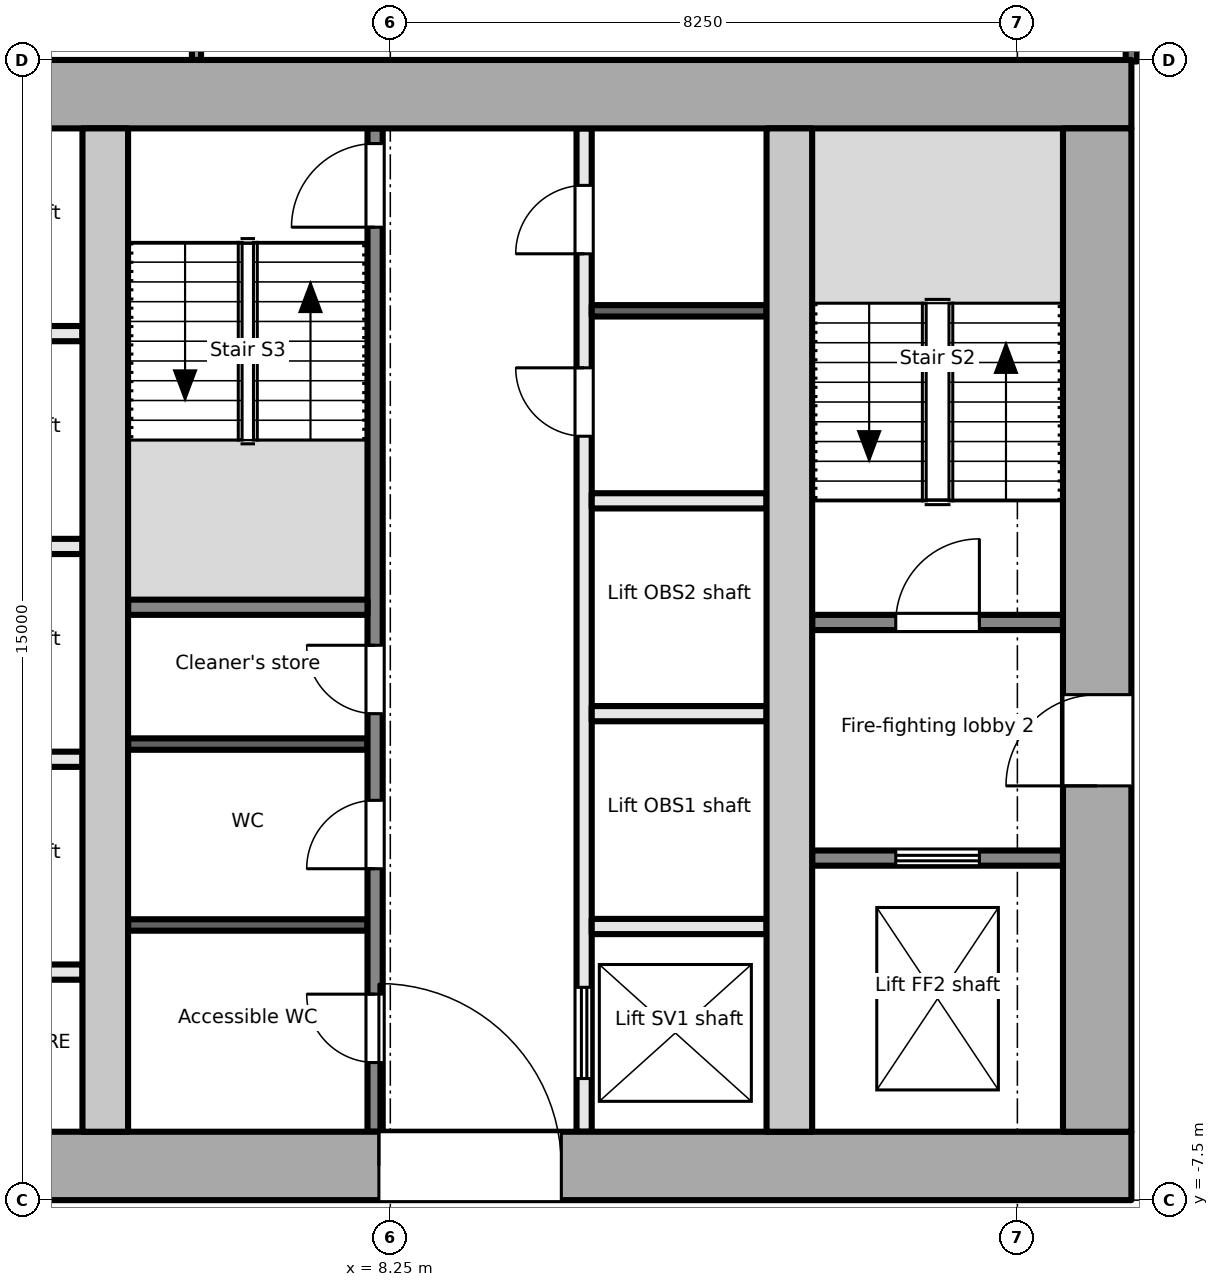
"""IFC4 building model, lengths in metres.
Left out: names, types, materials, properties, quantities, classifications, styles, units other than length and angle.
Written with IfcOpenShell. Run it as: python <this file> out.ifc"""

import sys

from ifc_helpers import new_model, si_unit, direction, frame, frame_2d, origin, place, context, subcontext, project, spatial, rectangle, extrude, element, fill, save


model = new_model("IFC4")
c1 = context("Model", 3, precision=1e-05, world=origin(), true_north=direction((0.0, 1.0)))
c2 = subcontext(c1, "Body", "Model", "MODEL_VIEW")
j1 = project(units=[si_unit("LENGTHUNIT", "METRE"), si_unit("PLANEANGLEUNIT", "RADIAN")], contexts=[c1])
p1 = place(None, origin())
s1 = spatial("IfcSite", under=j1, at=p1, CompositionType="ELEMENT")
p2 = place(p1, origin())
s2 = spatial("IfcBuilding", under=s1, at=p2, CompositionType="ELEMENT")
p3 = place(p2, frame((0.0, 0.0, 103.7)))
s3 = spatial("IfcBuildingStorey", under=s2, at=p3, CompositionType="ELEMENT", Elevation=103.7)
p4 = place(p3, frame((-18.0, -7.05, -0.2), z_axis=(0.0, 0.0, 1.0), x_axis=(1.0, 0.0, 0.0)))
e1 = element("IfcWall", 1, at=p4, inside=s3, PredefinedType="SHEAR", context=c2, shape_type="SweptSolid", body=[
    extrude(rectangle(XDim=36.0, YDim=0.9, at=frame_2d((18.0, 0.0))), origin(), (0.0, 0.0, 1.0), 4.0),
])
p5 = place(p4, frame((7.8, 0.0, 0.2)))
e2 = element("IfcOpeningElement", 2, at=p5, cuts=e1, PredefinedType="OPENING", context=c2, shape_type="SweptSolid", body=[
    extrude(rectangle(XDim=2.4, YDim=2.1, at=frame_2d((1.2, 1.05))), frame((0.0, 0.46, 0.0), z_axis=(0.0, -1.0, 0.0), x_axis=(1.0, 0.0, 0.0)), (0.0, 0.0, 1.0), 0.921),
])
p6 = place(p4, frame((17.4, 0.0, 0.2)))
e3 = element("IfcOpeningElement", 3, at=p6, cuts=e1, PredefinedType="OPENING", context=c2, shape_type="SweptSolid", body=[
    extrude(rectangle(XDim=1.2, YDim=2.1, at=frame_2d((0.6, 1.05))), frame((0.0, 0.46, 0.0), z_axis=(0.0, -1.0, 0.0), x_axis=(1.0, 0.0, 0.0)), (0.0, 0.0, 1.0), 0.921),
])
p7 = place(p4, frame((26.1, 0.0, 0.2)))
e4 = element("IfcOpeningElement", 4, at=p7, cuts=e1, PredefinedType="OPENING", context=c2, shape_type="SweptSolid", body=[
    extrude(rectangle(XDim=2.4, YDim=2.1, at=frame_2d((1.2, 1.05))), frame((0.0, 0.46, 0.0), z_axis=(0.0, -1.0, 0.0), x_axis=(1.0, 0.0, 0.0)), (0.0, 0.0, 1.0), 0.921),
])
p8 = place(p3, frame((-18.0, 7.05, -0.2), z_axis=(0.0, 0.0, 1.0), x_axis=(1.0, 0.0, 0.0)))
e5 = element("IfcWall", 5, at=p8, inside=s3, PredefinedType="SHEAR", context=c2, shape_type="SweptSolid", body=[
    extrude(rectangle(XDim=36.0, YDim=0.9, at=frame_2d((18.0, 0.0))), origin(), (0.0, 0.0, 1.0), 4.0),
])
p9 = place(p3, frame((17.55, -6.6, -0.2), z_axis=(0.0, 0.0, 1.0), x_axis=(0.0, 1.0, 0.0)))
e6 = element("IfcWall", 6, at=p9, inside=s3, PredefinedType="SHEAR", context=c2, shape_type="SweptSolid", body=[
    extrude(rectangle(XDim=13.2, YDim=0.9, at=frame_2d((6.6, 0.0))), origin(), (0.0, 0.0, 1.0), 4.0),
])
p10 = place(p9, frame((4.55, 0.0, 0.2)))
e7 = element("IfcOpeningElement", 7, at=p10, cuts=e6, PredefinedType="OPENING", context=c2, shape_type="SweptSolid", body=[
    extrude(rectangle(XDim=1.2, YDim=2.1, at=frame_2d((0.6, 1.05))), frame((0.0, 0.46, 0.0), z_axis=(0.0, -1.0, 0.0), x_axis=(1.0, 0.0, 0.0)), (0.0, 0.0, 1.0), 0.921),
])
for number, where, z_axis, x_axis in (
    (8, (4.5, -6.6, -0.2), (0.0, 0.0, 1.0), (0.0, 1.0, 0.0)),
    (9, (13.5, -6.6, -0.2), (0.0, 0.0, 1.0), (0.0, 1.0, 0.0)),
):
    element("IfcWall", number, at=place(p3, frame(where, z_axis=z_axis, x_axis=x_axis)), inside=s3, PredefinedType="SHEAR", context=c2, shape_type="SweptSolid", body=[
        extrude(rectangle(XDim=13.2, YDim=0.6, at=frame_2d((6.6, 0.0))), origin(), (0.0, 0.0, 1.0), 4.0),
    ])
p11 = place(p3, frame((13.8, -3.0, 0.0), z_axis=(0.0, 0.0, 1.0), x_axis=(1.0, 0.0, 0.0)))
e10 = element("IfcWall", 10, at=p11, inside=s3, PredefinedType="PARTITIONING", context=c2, shape_type="SweptSolid", body=[
    extrude(rectangle(XDim=3.3, YDim=0.2, at=frame_2d((1.65, 0.0))), origin(), (0.0, 0.0, 1.0), 3.8),
])
p12 = place(p11, frame((1.1, 0.0, 0.0)))
e11 = element("IfcOpeningElement", 11, at=p12, cuts=e10, PredefinedType="OPENING", context=c2, shape_type="SweptSolid", body=[
    extrude(rectangle(XDim=1.1, YDim=2.1, at=frame_2d((0.55, 1.05))), frame((0.0, 0.111, 0.0), z_axis=(0.0, -1.0, 0.0), x_axis=(1.0, 0.0, 0.0)), (0.0, 0.0, 1.0), 0.221),
])
p13 = place(p3, frame((13.8, 0.1, 0.0), z_axis=(0.0, 0.0, 1.0), x_axis=(1.0, 0.0, 0.0)))
e12 = element("IfcWall", 12, at=p13, inside=s3, PredefinedType="PARTITIONING", context=c2, shape_type="SweptSolid", body=[
    extrude(rectangle(XDim=3.3, YDim=0.2, at=frame_2d((1.65, 0.0))), origin(), (0.0, 0.0, 1.0), 3.8),
])
p14 = place(p13, frame((1.1, 0.0, 0.0)))
e13 = element("IfcOpeningElement", 13, at=p14, cuts=e12, PredefinedType="OPENING", context=c2, shape_type="SweptSolid", body=[
    extrude(rectangle(XDim=1.1, YDim=2.1, at=frame_2d((0.55, 1.05))), frame((0.0, 0.111, 0.0), z_axis=(0.0, -1.0, 0.0), x_axis=(1.0, 0.0, 0.0)), (0.0, 0.0, 1.0), 0.221),
])
for number, where, z_axis, x_axis in (
    (14, (1.9, -1.7, 0.0), (0.0, 0.0, 1.0), (1.0, 0.0, 0.0)),
    (15, (1.9, 1.1, 0.0), (0.0, 0.0, 1.0), (1.0, 0.0, 0.0)),
    (16, (1.9, 3.9, 0.0), (0.0, 0.0, 1.0), (1.0, 0.0, 0.0)),
    (17, (1.9, -4.5, 0.0), (0.0, 0.0, 1.0), (1.0, 0.0, 0.0)),
):
    element("IfcWall", number, at=place(p3, frame(where, z_axis=z_axis, x_axis=x_axis)), inside=s3, PredefinedType="PARTITIONING", context=c2, shape_type="SweptSolid", body=[
        extrude(rectangle(XDim=2.3, YDim=0.2, at=frame_2d((1.15, 0.0))), origin(), (0.0, 0.0, 1.0), 3.8),
    ])
p15 = place(p3, frame((8.05, -6.6, 0.0), z_axis=(0.0, 0.0, 1.0), x_axis=(0.0, 1.0, 0.0)))
e18 = element("IfcWall", 18, at=p15, inside=s3, PredefinedType="PARTITIONING", context=c2, shape_type="SweptSolid", body=[
    extrude(rectangle(XDim=13.2, YDim=0.2, at=frame_2d((6.6, 0.0))), origin(), (0.0, 0.0, 1.0), 3.8),
])
p16 = place(p15, frame((0.91, 0.0, 0.0)))
e19 = element("IfcOpeningElement", 19, at=p16, cuts=e18, PredefinedType="OPENING", context=c2, shape_type="SweptSolid", body=[
    extrude(rectangle(XDim=0.9, YDim=2.1, at=frame_2d((0.45, 1.05))), frame((0.0, 0.111, 0.0), z_axis=(0.0, -1.0, 0.0), x_axis=(1.0, 0.0, 0.0)), (0.0, 0.0, 1.0), 0.221),
])
p17 = place(p15, frame((3.46, 0.0, 0.0)))
e20 = element("IfcOpeningElement", 20, at=p17, cuts=e18, PredefinedType="OPENING", context=c2, shape_type="SweptSolid", body=[
    extrude(rectangle(XDim=0.9, YDim=2.1, at=frame_2d((0.45, 1.05))), frame((0.0, 0.111, 0.0), z_axis=(0.0, -1.0, 0.0), x_axis=(1.0, 0.0, 0.0)), (0.0, 0.0, 1.0), 0.221),
])
p18 = place(p15, frame((5.5, 0.0, 0.0)))
e21 = element("IfcOpeningElement", 21, at=p18, cuts=e18, PredefinedType="OPENING", context=c2, shape_type="SweptSolid", body=[
    extrude(rectangle(XDim=0.9, YDim=2.1, at=frame_2d((0.45, 1.05))), frame((0.0, 0.111, 0.0), z_axis=(0.0, -1.0, 0.0), x_axis=(1.0, 0.0, 0.0)), (0.0, 0.0, 1.0), 0.221),
])
p19 = place(p15, frame((11.9, 0.0, 0.0)))
e22 = element("IfcOpeningElement", 22, at=p19, cuts=e18, PredefinedType="OPENING", context=c2, shape_type="SweptSolid", body=[
    extrude(rectangle(XDim=1.1, YDim=2.1, at=frame_2d((0.55, 1.05))), frame((0.0, 0.111, 0.0), z_axis=(0.0, -1.0, 0.0), x_axis=(1.0, 0.0, 0.0)), (0.0, 0.0, 1.0), 0.221),
])
p20 = place(p3, frame((10.8, -6.6, 0.0), z_axis=(0.0, 0.0, 1.0), x_axis=(0.0, 1.0, 0.0)))
e23 = element("IfcWall", 23, at=p20, inside=s3, PredefinedType="PARTITIONING", context=c2, shape_type="SweptSolid", body=[
    extrude(rectangle(XDim=13.2, YDim=0.2, at=frame_2d((6.6, 0.0))), origin(), (0.0, 0.0, 1.0), 3.8),
])
p21 = place(p20, frame((0.7, 0.0, 0.0)))
e24 = element("IfcOpeningElement", 24, at=p21, cuts=e23, PredefinedType="OPENING", context=c2, shape_type="SweptSolid", body=[
    extrude(rectangle(XDim=1.2, YDim=2.1, at=frame_2d((0.6, 1.05))), frame((0.0, 0.111, 0.0), z_axis=(0.0, -1.0, 0.0), x_axis=(1.0, 0.0, 0.0)), (0.0, 0.0, 1.0), 0.221),
])
p22 = place(p20, frame((9.15, 0.0, 0.0)))
e25 = element("IfcOpeningElement", 25, at=p22, cuts=e23, PredefinedType="OPENING", context=c2, shape_type="SweptSolid", body=[
    extrude(rectangle(XDim=0.9, YDim=2.1, at=frame_2d((0.45, 1.05))), frame((0.0, 0.111, 0.0), z_axis=(0.0, -1.0, 0.0), x_axis=(1.0, 0.0, 0.0)), (0.0, 0.0, 1.0), 0.221),
])
p23 = place(p20, frame((11.55, 0.0, 0.0)))
e26 = element("IfcOpeningElement", 26, at=p23, cuts=e23, PredefinedType="OPENING", context=c2, shape_type="SweptSolid", body=[
    extrude(rectangle(XDim=0.9, YDim=2.1, at=frame_2d((0.45, 1.05))), frame((0.0, 0.111, 0.0), z_axis=(0.0, -1.0, 0.0), x_axis=(1.0, 0.0, 0.0)), (0.0, 0.0, 1.0), 0.221),
])
p24 = place(p3, frame((4.8, 0.3, 0.0), z_axis=(0.0, 0.0, 1.0), x_axis=(1.0, 0.0, 0.0)))
e27 = element("IfcWall", 27, at=p24, inside=s3, PredefinedType="PARTITIONING", context=c2, shape_type="SweptSolid", body=[
    extrude(rectangle(XDim=3.15, YDim=0.2, at=frame_2d((1.575, 0.0))), origin(), (0.0, 0.0, 1.0), 3.8),
])
for number, where, z_axis, x_axis in (
    (28, (4.8, -3.88, 0.0), (0.0, 0.0, 1.0), (1.0, 0.0, 0.0)),
    (29, (4.8, -1.5, 0.0), (0.0, 0.0, 1.0), (1.0, 0.0, 0.0)),
):
    element("IfcWall", number, at=place(p3, frame(where, z_axis=z_axis, x_axis=x_axis)), inside=s3, PredefinedType="PARTITIONING", context=c2, shape_type="SweptSolid", body=[
        extrude(rectangle(XDim=3.15, YDim=0.15, at=frame_2d((1.575, 0.0))), origin(), (0.0, 0.0, 1.0), 3.8),
    ])
for number, where, z_axis, x_axis in (
    (30, (10.9, -3.9, 0.0), (0.0, 0.0, 1.0), (1.0, 0.0, 0.0)),
    (31, (10.9, -1.1, 0.0), (0.0, 0.0, 1.0), (1.0, 0.0, 0.0)),
    (32, (10.9, 1.7, 0.0), (0.0, 0.0, 1.0), (1.0, 0.0, 0.0)),
):
    element("IfcWall", number, at=place(p3, frame(where, z_axis=z_axis, x_axis=x_axis)), inside=s3, PredefinedType="PARTITIONING", context=c2, shape_type="SweptSolid", body=[
        extrude(rectangle(XDim=2.3, YDim=0.2, at=frame_2d((1.15, 0.0))), origin(), (0.0, 0.0, 1.0), 3.8),
    ])
p25 = place(p3, frame((10.9, 4.2, 0.0), z_axis=(0.0, 0.0, 1.0), x_axis=(1.0, 0.0, 0.0)))
e33 = element("IfcWall", 33, at=p25, inside=s3, PredefinedType="PARTITIONING", context=c2, shape_type="SweptSolid", body=[
    extrude(rectangle(XDim=2.3, YDim=0.15, at=frame_2d((1.15, 0.0))), origin(), (0.0, 0.0, 1.0), 3.8),
])
p26 = place(p3, frame((18.0, 7.48, 0.0), z_axis=(0.0, 0.0, 1.0), x_axis=(0.0, 1.0, 0.0)))
e34 = element("IfcWall", 34, at=p26, inside=s3, PredefinedType="PARTITIONING", context=c2, shape_type="SweptSolid", body=[
    extrude(rectangle(XDim=3.26, YDim=0.15, at=frame_2d((1.63, 0.0))), origin(), (0.0, 0.0, 1.0), 2.8),
])
p27 = place(p26, frame((1.645, 0.0, 0.0)))
e35 = element("IfcOpeningElement", 35, at=p27, cuts=e34, PredefinedType="OPENING", context=c2, shape_type="SweptSolid", body=[
    extrude(rectangle(XDim=0.9, YDim=2.1, at=frame_2d((0.45, 1.05))), frame((0.0, 0.085, 0.0), z_axis=(0.0, -1.0, 0.0), x_axis=(1.0, 0.0, 0.0)), (0.0, 0.0, 1.0), 0.171),
])
p28 = place(p3, frame((5.7, 7.5, 0.0), z_axis=(0.0, 0.0, 1.0), x_axis=(0.0, 1.0, 0.0)))
e36 = element("IfcWall", 36, at=p28, inside=s3, PredefinedType="PARTITIONING", context=c2, shape_type="SweptSolid", body=[
    extrude(rectangle(XDim=2.94, YDim=0.12, at=frame_2d((1.47, 0.0))), origin(), (0.0, 0.0, 1.0), 3.8),
])
p29 = place(p28, frame((0.712, 0.0, 0.0)))
e37 = element("IfcOpeningElement", 37, at=p29, cuts=e36, PredefinedType="OPENING", context=c2, shape_type="SweptSolid", body=[
    extrude(rectangle(XDim=0.9, YDim=2.1, at=frame_2d((0.45, 1.05))), frame((0.0, 0.071, 0.0), z_axis=(0.0, -1.0, 0.0), x_axis=(1.0, 0.0, 0.0)), (0.0, 0.0, 1.0), 0.141),
])
p30 = place(p12, origin())
e38 = element("IfcDoor", 38, at=p30, inside=s3, OperationType="DOUBLE_DOOR_SLIDING", PredefinedType="DOOR", context=c2, shape_type="SweptSolid", body=[
    extrude(rectangle(XDim=1.1, YDim=2.1, at=frame_2d((0.55, 1.05))), frame((0.0, 0.025, 0.0), z_axis=(0.0, -1.0, 0.0), x_axis=(1.0, 0.0, 0.0)), (0.0, 0.0, 1.0), 0.05),
])
fill(e11, e38)
p31 = place(p10, origin())
e39 = element("IfcDoor", 39, at=p31, inside=s3, OperationType="SINGLE_SWING_LEFT", PredefinedType="DOOR", context=c2, shape_type="SweptSolid", body=[
    extrude(rectangle(XDim=1.2, YDim=2.1, at=frame_2d((0.6, 1.05))), frame((0.0, 0.025, 0.0), z_axis=(0.0, -1.0, 0.0), x_axis=(1.0, 0.0, 0.0)), (0.0, 0.0, 1.0), 0.05),
])
fill(e7, e39)
p32 = place(p14, origin())
e40 = element("IfcDoor", 40, at=p32, inside=s3, OperationType="SINGLE_SWING_RIGHT", PredefinedType="DOOR", context=c2, shape_type="SweptSolid", body=[
    extrude(rectangle(XDim=1.1, YDim=2.1, at=frame_2d((0.55, 1.05))), frame((0.0, 0.025, 0.0), z_axis=(0.0, -1.0, 0.0), x_axis=(1.0, 0.0, 0.0)), (0.0, 0.0, 1.0), 0.05),
])
fill(e13, e40)
p33 = place(p16, origin())
e41 = element("IfcDoor", 41, at=p33, inside=s3, OperationType="SINGLE_SWING_RIGHT", PredefinedType="DOOR", context=c2, shape_type="SweptSolid", body=[
    extrude(rectangle(XDim=0.9, YDim=2.1, at=frame_2d((0.45, 1.05))), frame((0.0, 0.025, 0.0), z_axis=(0.0, -1.0, 0.0), x_axis=(1.0, 0.0, 0.0)), (0.0, 0.0, 1.0), 0.05),
])
fill(e19, e41)
p34 = place(p17, origin())
e42 = element("IfcDoor", 42, at=p34, inside=s3, OperationType="SINGLE_SWING_LEFT", PredefinedType="DOOR", context=c2, shape_type="SweptSolid", body=[
    extrude(rectangle(XDim=0.9, YDim=2.1, at=frame_2d((0.45, 1.05))), frame((0.0, 0.025, 0.0), z_axis=(0.0, -1.0, 0.0), x_axis=(1.0, 0.0, 0.0)), (0.0, 0.0, 1.0), 0.05),
])
fill(e20, e42)
p35 = place(p18, origin())
e43 = element("IfcDoor", 43, at=p35, inside=s3, OperationType="SINGLE_SWING_RIGHT", PredefinedType="DOOR", context=c2, shape_type="SweptSolid", body=[
    extrude(rectangle(XDim=0.9, YDim=2.1, at=frame_2d((0.45, 1.05))), frame((0.0, 0.025, 0.0), z_axis=(0.0, -1.0, 0.0), x_axis=(1.0, 0.0, 0.0)), (0.0, 0.0, 1.0), 0.05),
])
fill(e21, e43)
p36 = place(p19, origin())
e44 = element("IfcDoor", 44, at=p36, inside=s3, OperationType="SINGLE_SWING_LEFT", PredefinedType="DOOR", context=c2, shape_type="SweptSolid", body=[
    extrude(rectangle(XDim=1.1, YDim=2.1, at=frame_2d((0.55, 1.05))), frame((0.0, 0.025, 0.0), z_axis=(0.0, -1.0, 0.0), x_axis=(1.0, 0.0, 0.0)), (0.0, 0.0, 1.0), 0.05),
])
fill(e22, e44)
p37 = place(p7, origin())
e45 = element("IfcDoor", 45, at=p37, inside=s3, OperationType="DOUBLE_DOOR_DOUBLE_SWING", PredefinedType="DOOR", context=c2, shape_type="SweptSolid", body=[
    extrude(rectangle(XDim=2.4, YDim=2.1, at=frame_2d((1.2, 1.05))), frame((0.0, 0.025, 0.0), z_axis=(0.0, -1.0, 0.0), x_axis=(1.0, 0.0, 0.0)), (0.0, 0.0, 1.0), 0.05),
])
fill(e4, e45)
p38 = place(p21, origin())
e46 = element("IfcDoor", 46, at=p38, inside=s3, OperationType="DOUBLE_DOOR_SLIDING", PredefinedType="DOOR", context=c2, shape_type="SweptSolid", body=[
    extrude(rectangle(XDim=1.2, YDim=2.1, at=frame_2d((0.6, 1.05))), frame((0.0, 0.025, 0.0), z_axis=(0.0, -1.0, 0.0), x_axis=(1.0, 0.0, 0.0)), (0.0, 0.0, 1.0), 0.05),
])
fill(e24, e46)
p39 = place(p22, origin())
e47 = element("IfcDoor", 47, at=p39, inside=s3, OperationType="SINGLE_SWING_RIGHT", PredefinedType="DOOR", context=c2, shape_type="SweptSolid", body=[
    extrude(rectangle(XDim=0.9, YDim=2.1, at=frame_2d((0.45, 1.05))), frame((0.0, 0.025, 0.0), z_axis=(0.0, -1.0, 0.0), x_axis=(1.0, 0.0, 0.0)), (0.0, 0.0, 1.0), 0.05),
])
fill(e25, e47)
p40 = place(p23, origin())
e48 = element("IfcDoor", 48, at=p40, inside=s3, OperationType="SINGLE_SWING_LEFT", PredefinedType="DOOR", context=c2, shape_type="SweptSolid", body=[
    extrude(rectangle(XDim=0.9, YDim=2.1, at=frame_2d((0.45, 1.05))), frame((0.0, 0.025, 0.0), z_axis=(0.0, -1.0, 0.0), x_axis=(1.0, 0.0, 0.0)), (0.0, 0.0, 1.0), 0.05),
])
fill(e26, e48)
save(model, sys.argv[1])
